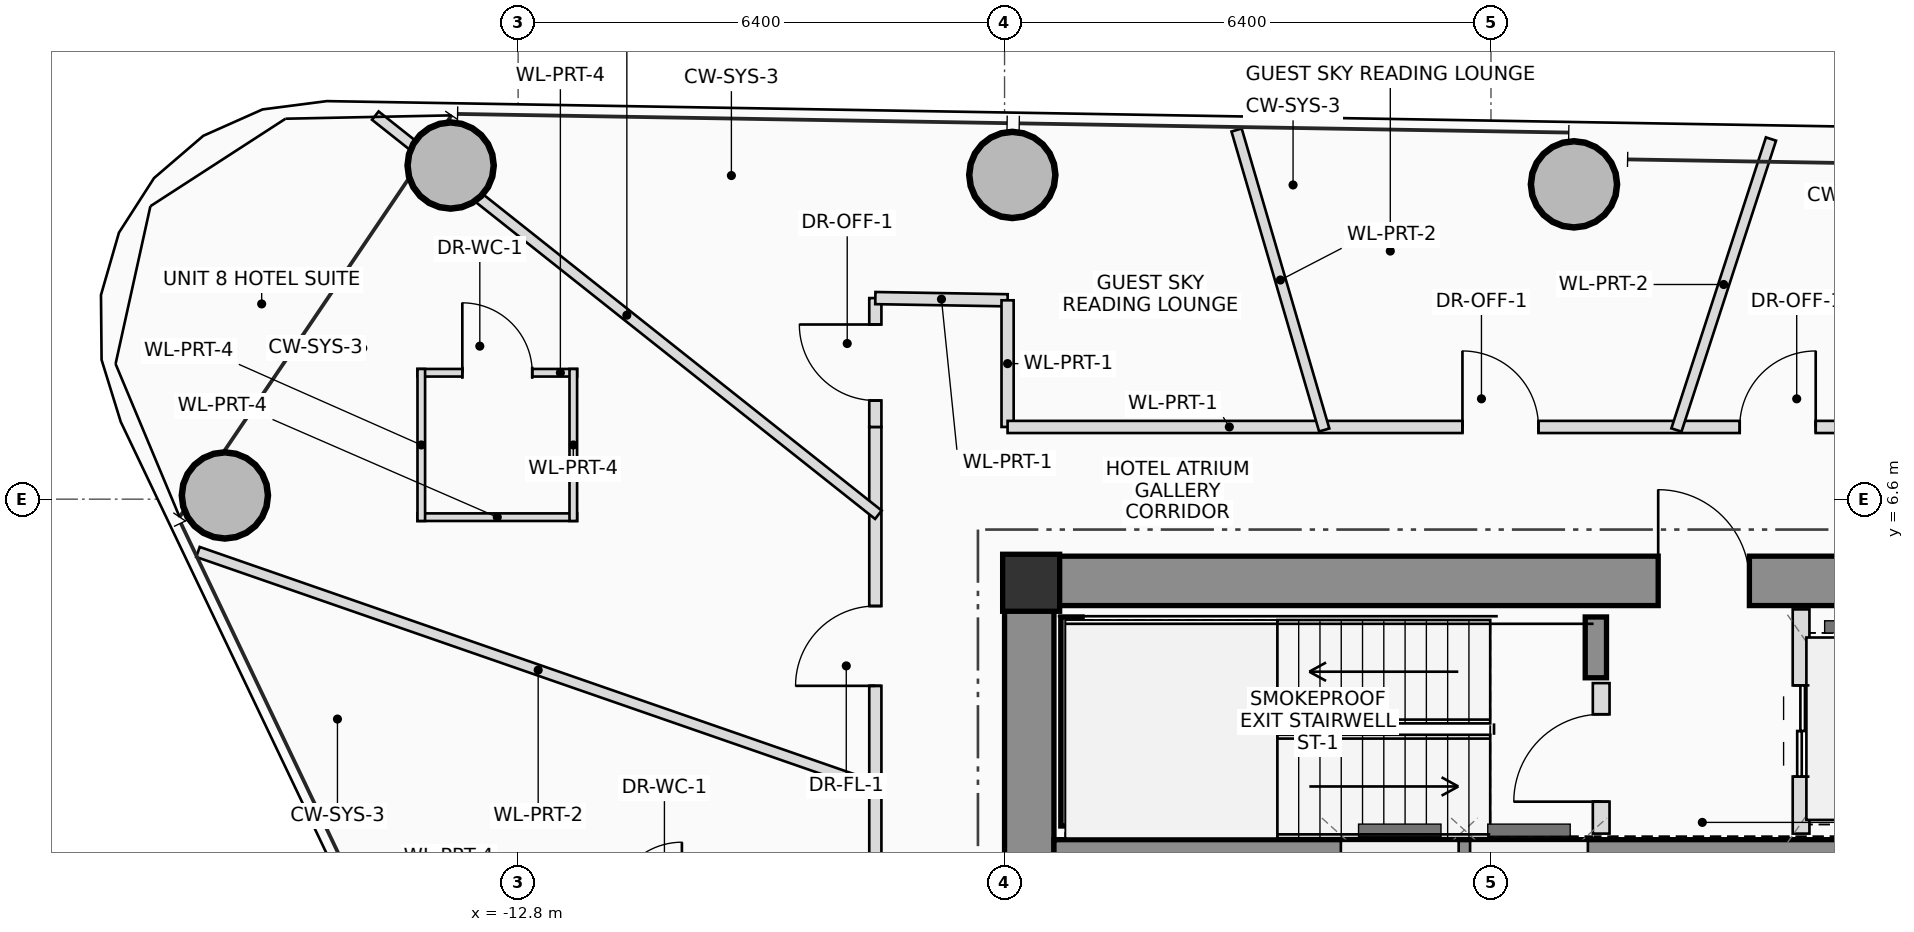
"""IFC4 building model, lengths in metres.
Left out: names, types, materials, properties, quantities, classifications, styles, units other than length and angle.
Written with IfcOpenShell. Run it as: python <this file> out.ifc"""

import sys

from ifc_helpers import new_model, si_unit, direction, frame, frame_2d, origin, origin_2d, place, context, subcontext, project, spatial, rectangle, hollow_circle, extrude, source, transform, mapped, element, fill, save


model = new_model("IFC4")
c1 = context("Model", 3, precision=1e-05, world=origin(), true_north=direction((0.0, 1.0)))
c2 = subcontext(c1, "Body", "Model", "MODEL_VIEW")
j1 = project(units=[si_unit("LENGTHUNIT", "METRE"), si_unit("PLANEANGLEUNIT", "RADIAN")], contexts=[c1])
p1 = place(None, origin())
s1 = spatial("IfcSite", under=j1, at=p1, CompositionType="ELEMENT")
p2 = place(p1, origin())
s2 = spatial("IfcBuilding", under=s1, at=p2, CompositionType="ELEMENT")
p3 = place(p2, frame((0.0, 0.0, 208.7)))
s3 = spatial("IfcBuildingStorey", under=s2, at=p3, CompositionType="ELEMENT", Elevation=208.7)
m1 = source(origin(), c2, "Body", "SweptSolid", [
    extrude(rectangle(XDim=0.75, YDim=0.75, at=origin_2d()), origin(), (0.0, 0.0, 1.0), 3.45),
])
p4 = place(p3, frame((-6.05, 5.5, 0.0), z_axis=(0.0, 0.0, 1.0), x_axis=(1.0, 0.0, 0.0)))
e1 = element("IfcColumn", 1, at=p4, inside=s3, PredefinedType="COLUMN", context=c2, shape_type="MappedRepresentation", body=[
    mapped(m1, transform((0.0, 0.0, 0.0), scale=1.0)),
])
p5 = place(p3, frame((-6.4, 5.525, 0.0), z_axis=(0.0, 0.0, 1.0), x_axis=(1.0, 0.0, 0.0)))
e2 = element("IfcWall", 2, at=p5, inside=s3, PredefinedType="SHEAR", context=c2, shape_type="SweptSolid", body=[
    extrude(rectangle(XDim=12.8, YDim=0.65, at=frame_2d((6.4, 0.0))), origin(), (0.0, 0.0, 1.0), 3.45),
])
p6 = place(p5, frame((8.6, 0.0, 0.0)))
e3 = element("IfcOpeningElement", 3, at=p6, cuts=e2, PredefinedType="OPENING", context=c2, shape_type="SweptSolid", body=[
    extrude(rectangle(XDim=1.2, YDim=2.2, at=frame_2d((0.6, 1.1))), frame((0.0, 0.335, 0.0), z_axis=(0.0, -1.0, 0.0), x_axis=(1.0, 0.0, 0.0)), (0.0, 0.0, 1.0), 0.67),
])
p7 = place(p3, frame((-6.075, 1.75, 0.0), z_axis=(0.0, 0.0, 1.0), x_axis=(0.0, 1.0, 0.0)))
e4 = element("IfcWall", 4, at=p7, inside=s3, PredefinedType="SHEAR", context=c2, shape_type="SweptSolid", body=[
    extrude(rectangle(XDim=3.45, YDim=0.65, at=frame_2d((1.725, 0.0))), origin(), (0.0, 0.0, 1.0), 3.45),
])
p8 = place(p3, frame((-5.75, 1.94, 0.0), z_axis=(0.0, 0.0, 1.0), x_axis=(1.0, 0.0, 0.0)))
e5 = element("IfcWall", 5, at=p8, inside=s3, PredefinedType="SHEAR", context=c2, shape_type="SweptSolid", body=[
    extrude(rectangle(XDim=11.5, YDim=0.36, at=frame_2d((5.75, 0.0))), origin(), (0.0, 0.0, 1.0), 3.45),
])
p9 = place(p3, frame((-5.52, 2.3, 0.0), z_axis=(0.0, 0.0, 1.0), x_axis=(0.0, 1.0, 0.0)))
e6 = element("IfcWall", 6, at=p9, inside=s3, PredefinedType="SHEAR", context=c2, shape_type="SweptSolid", body=[
    extrude(rectangle(XDim=2.75, YDim=0.28, at=frame_2d((1.375, 0.0))), origin(), (0.0, 0.0, 1.0), 3.45),
])
p10 = place(p3, frame((1.38, 4.25, 0.0), z_axis=(0.0, 0.0, 1.0), x_axis=(0.0, 1.0, 0.0)))
e7 = element("IfcWall", 7, at=p10, inside=s3, PredefinedType="SHEAR", context=c2, shape_type="SweptSolid", body=[
    extrude(rectangle(XDim=0.8, YDim=0.28, at=frame_2d((0.4, 0.0))), origin(), (0.0, 0.0, 1.0), 3.45),
])
m2 = source(origin(), c2, "Body", "SweptSolid", [
    extrude(hollow_circle(Radius=0.575, WallThickness=0.042, at=origin_2d()), origin(), (0.0, 0.0, 1.0), 3.45),
])
for number, where, z_axis, x_axis in (
    (8, (1.092, 10.742, 0.0), (0.0, 0.0, 1.0), (1.0, 0.0, 0.0)),
    (9, (-6.298, 10.865, 0.0), (0.0, 0.0, 1.0), (1.0, 0.0, 0.0)),
    (10, (-13.688, 10.99, 0.0), (0.0, 0.0, 1.0), (1.0, 0.0, 0.0)),
    (11, (-16.658, 6.649, 0.0), (0.0, 0.0, 1.0), (1.0, 0.0, 0.0)),
):
    element("IfcColumn", number, at=place(p3, frame(where, z_axis=z_axis, x_axis=x_axis)), inside=s3, PredefinedType="COLUMN", context=c2, shape_type="MappedRepresentation", body=[
        mapped(m2, transform((0.0, 0.0, 0.0), scale=1.0)),
    ])
p11 = place(p3, frame((1.45, 2.2, 0.0), z_axis=(0.0, 0.0, 1.0), x_axis=(0.0, 1.0, 0.0)))
e12 = element("IfcWall", 12, at=p11, inside=s3, PredefinedType="PLUMBINGWALL", context=c2, shape_type="SweptSolid", body=[
    extrude(rectangle(XDim=1.98, YDim=0.22, at=frame_2d((0.99, 0.0))), origin(), (0.0, 0.0, 1.0), 3.25),
])
p12 = place(p11, frame((0.42, 0.0, 0.0)))
e13 = element("IfcOpeningElement", 13, at=p12, cuts=e12, PredefinedType="OPENING", context=c2, shape_type="SweptSolid", body=[
    extrude(rectangle(XDim=1.15, YDim=2.15, at=frame_2d((0.575, 1.075))), frame((0.0, 0.12, 0.0), z_axis=(0.0, -1.0, 0.0), x_axis=(1.0, 0.0, 0.0)), (0.0, 0.0, 1.0), 0.24),
])
p13 = place(p3, frame((4.08, 2.2, 0.0), z_axis=(0.0, 0.0, 1.0), x_axis=(0.0, 1.0, 0.0)))
e14 = element("IfcWall", 14, at=p13, inside=s3, PredefinedType="PLUMBINGWALL", context=c2, shape_type="SweptSolid", body=[
    extrude(rectangle(XDim=2.95, YDim=0.22, at=frame_2d((1.475, 0.0))), origin(), (0.0, 0.0, 1.0), 3.25),
])
p14 = place(p13, frame((0.75, 0.0, 0.0)))
e15 = element("IfcOpeningElement", 15, at=p14, cuts=e14, PredefinedType="OPENING", context=c2, shape_type="SweptSolid", body=[
    extrude(rectangle(XDim=1.2, YDim=2.25, at=frame_2d((0.6, 1.125))), frame((0.0, 0.12, 0.0), z_axis=(0.0, -1.0, 0.0), x_axis=(1.0, 0.0, 0.0)), (0.0, 0.0, 1.0), 0.24),
])
p15 = place(p3, frame((-14.124, 8.263, 0.0), z_axis=(0.0, 0.0, 1.0), x_axis=(1.0, 0.0, 0.0)))
e16 = element("IfcWall", 16, at=p15, inside=s3, PredefinedType="PARTITIONING", context=c2, shape_type="SweptSolid", body=[
    extrude(rectangle(XDim=2.1, YDim=0.1, at=frame_2d((1.05, 0.0))), origin(), (0.0, 0.0, 1.0), 3.25),
])
p16 = place(p15, frame((0.59, 0.0, 0.0)))
e17 = element("IfcOpeningElement", 17, at=p16, cuts=e16, PredefinedType="OPENING", context=c2, shape_type="SweptSolid", body=[
    extrude(rectangle(XDim=0.92, YDim=2.1, at=frame_2d((0.46, 1.05))), frame((0.0, 0.06, 0.0), z_axis=(0.0, -1.0, 0.0), x_axis=(1.0, 0.0, 0.0)), (0.0, 0.0, 1.0), 0.12),
])
p17 = place(p3, frame((-12.024, 6.363, 0.0), z_axis=(0.0, 0.0, 1.0), x_axis=(-1.0, 0.0, 0.0)))
e18 = element("IfcWall", 18, at=p17, inside=s3, PredefinedType="PARTITIONING", context=c2, shape_type="SweptSolid", body=[
    extrude(rectangle(XDim=2.1, YDim=0.1, at=frame_2d((1.05, 0.0))), origin(), (0.0, 0.0, 1.0), 2.605),
])
p18 = place(p3, frame((-12.074, 8.313, 0.0), z_axis=(0.0, 0.0, 1.0), x_axis=(0.0, -1.0, 0.0)))
e19 = element("IfcWall", 19, at=p18, inside=s3, PredefinedType="PARTITIONING", context=c2, shape_type="SweptSolid", body=[
    extrude(rectangle(XDim=2.0, YDim=0.1, at=frame_2d((1.0, 0.0))), origin(), (0.0, 0.0, 1.0), 2.905),
])
p19 = place(p3, frame((-14.074, 6.313, 0.0), z_axis=(0.0, 0.0, 1.0), x_axis=(0.0, 1.0, 0.0)))
e20 = element("IfcWall", 20, at=p19, inside=s3, PredefinedType="PARTITIONING", context=c2, shape_type="SweptSolid", body=[
    extrude(rectangle(XDim=2.0, YDim=0.1, at=frame_2d((1.0, 0.0))), origin(), (0.0, 0.0, 1.0), 2.605),
])
p20 = place(p3, frame((-8.1, -7.46, 0.0), z_axis=(0.0, 0.0, 1.0), x_axis=(0.0, 1.0, 0.0)))
e21 = element("IfcWall", 21, at=p20, inside=s3, PredefinedType="PARTITIONING", context=c2, shape_type="SweptSolid", body=[
    extrude(rectangle(XDim=15.01, YDim=0.16, at=frame_2d((7.505, 0.0))), origin(), (0.0, 0.0, 1.0), 2.605),
])
p21 = place(p20, frame((1.537, 0.0, 0.0)))
e22 = element("IfcOpeningElement", 22, at=p21, cuts=e21, PredefinedType="OPENING", context=c2, shape_type="SweptSolid", body=[
    extrude(rectangle(XDim=0.9, YDim=2.05, at=frame_2d((0.45, 1.025))), frame((0.0, 0.09, 0.0), z_axis=(0.0, -1.0, 0.0), x_axis=(1.0, 0.0, 0.0)), (0.0, 0.0, 1.0), 0.18),
])
p22 = place(p20, frame((6.522, 0.0, 0.0)))
e23 = element("IfcOpeningElement", 23, at=p22, cuts=e21, PredefinedType="OPENING", context=c2, shape_type="SweptSolid", body=[
    extrude(rectangle(XDim=1.05, YDim=2.2, at=frame_2d((0.525, 1.1))), frame((0.0, 0.09, 0.0), z_axis=(0.0, -1.0, 0.0), x_axis=(1.0, 0.0, 0.0)), (0.0, 0.0, 1.0), 0.18),
])
p23 = place(p20, frame((11.604, 0.0, 0.0)))
e24 = element("IfcOpeningElement", 24, at=p23, cuts=e21, PredefinedType="OPENING", context=c2, shape_type="SweptSolid", body=[
    extrude(rectangle(XDim=1.05, YDim=2.2, at=frame_2d((0.525, 1.1))), frame((0.0, 0.09, 0.0), z_axis=(0.0, -1.0, 0.0), x_axis=(1.0, 0.0, 0.0)), (0.0, 0.0, 1.0), 0.18),
])
p24 = place(p3, frame((-8.1, 7.55, 0.0), z_axis=(0.0, 0.0, 1.0), x_axis=(0.0, 1.0, 0.0)))
e25 = element("IfcWall", 25, at=p24, inside=s3, PredefinedType="PARTITIONING", context=c2, shape_type="SweptSolid", body=[
    extrude(rectangle(XDim=1.696, YDim=0.16, at=frame_2d((0.848, 0.0))), origin(), (0.0, 0.0, 1.0), 2.805),
])
p25 = place(p24, frame((0.348, 0.0, 0.0)))
e26 = element("IfcOpeningElement", 26, at=p25, cuts=e25, PredefinedType="OPENING", context=c2, shape_type="SweptSolid", body=[
    extrude(rectangle(XDim=1.0, YDim=2.25, at=frame_2d((0.5, 1.125))), frame((0.0, 0.09, 0.0), z_axis=(0.0, -1.0, 0.0), x_axis=(1.0, 0.0, 0.0)), (0.0, 0.0, 1.0), 0.18),
])
p26 = place(p3, frame((-8.1, 9.246, 0.0), z_axis=(0.0, 0.0, 1.0), x_axis=(0.999858281466, -0.016834992813, 0.0)))
e27 = element("IfcWall", 27, at=p26, inside=s3, PredefinedType="PARTITIONING", context=c2, shape_type="SweptSolid", body=[
    extrude(rectangle(XDim=1.74, YDim=0.16, at=frame_2d((0.87, 0.0))), origin(), (0.0, 0.0, 1.0), 2.905),
])
p27 = place(p3, frame((-6.36, 9.216, 0.0), z_axis=(0.0, 0.0, 1.0), x_axis=(0.0, -1.0, 0.0)))
e28 = element("IfcWall", 28, at=p27, inside=s3, PredefinedType="PARTITIONING", context=c2, shape_type="SweptSolid", body=[
    extrude(rectangle(XDim=1.666, YDim=0.16, at=frame_2d((0.833, 0.0))), origin(), (0.0, 0.0, 1.0), 2.605),
])
p28 = place(p3, frame((-6.36, 7.55, 0.0), z_axis=(0.0, 0.0, 1.0), x_axis=(1.0, 0.0, 0.0)))
e29 = element("IfcWall", 29, at=p28, inside=s3, PredefinedType="PARTITIONING", context=c2, shape_type="SweptSolid", body=[
    extrude(rectangle(XDim=11.61, YDim=0.16, at=frame_2d((5.805, 0.0))), origin(), (0.0, 0.0, 1.0), 2.605),
])
p29 = place(p28, frame((5.985, 0.0, 0.0)))
e30 = element("IfcOpeningElement", 30, at=p29, cuts=e29, PredefinedType="OPENING", context=c2, shape_type="SweptSolid", body=[
    extrude(rectangle(XDim=1.0, YDim=2.25, at=frame_2d((0.5, 1.125))), frame((0.0, 0.09, 0.0), z_axis=(0.0, -1.0, 0.0), x_axis=(1.0, 0.0, 0.0)), (0.0, 0.0, 1.0), 0.18),
])
p30 = place(p28, frame((9.633, 0.0, 0.0)))
e31 = element("IfcOpeningElement", 31, at=p30, cuts=e29, PredefinedType="OPENING", context=c2, shape_type="SweptSolid", body=[
    extrude(rectangle(XDim=1.0, YDim=2.25, at=frame_2d((0.5, 1.125))), frame((0.0, 0.09, 0.0), z_axis=(0.0, -1.0, 0.0), x_axis=(1.0, 0.0, 0.0)), (0.0, 0.0, 1.0), 0.18),
])
p31 = place(p3, frame((2.44, 7.51, 0.0), z_axis=(0.0, 0.0, 1.0), x_axis=(0.309013387048, 0.951057688379, 0.0)))
e32 = element("IfcWall", 32, at=p31, inside=s3, PredefinedType="PARTITIONING", context=c2, shape_type="SweptSolid", body=[
    extrude(rectangle(XDim=4.025, YDim=0.14, at=frame_2d((2.013, 0.0))), origin(), (0.0, 0.0, 1.0), 2.605),
])
p32 = place(p3, frame((-2.194, 7.51, 0.0), z_axis=(0.0, 0.0, 1.0), x_axis=(-0.280410435425, 0.959880194454, 0.0)))
e33 = element("IfcWall", 33, at=p32, inside=s3, PredefinedType="PARTITIONING", context=c2, shape_type="SweptSolid", body=[
    extrude(rectangle(XDim=4.111, YDim=0.14, at=frame_2d((2.056, 0.0))), origin(), (0.0, 0.0, 1.0), 2.765),
])
p33 = place(p3, frame((-8.06, 6.395, 0.0), z_axis=(0.0, 0.0, 1.0), x_axis=(-0.783385602556, 0.621535998723, 0.0)))
e34 = element("IfcWall", 34, at=p33, inside=s3, PredefinedType="PARTITIONING", context=c2, shape_type="SweptSolid", body=[
    extrude(rectangle(XDim=8.449, YDim=0.14, at=frame_2d((4.224, 0.0))), origin(), (0.0, 0.0, 1.0), 2.605),
])
p34 = place(p3, frame((-8.06, 2.798, 0.0), z_axis=(0.0, 0.0, 1.0), x_axis=(-0.944705149401, 0.327920997643, 0.0)))
e35 = element("IfcWall", 35, at=p34, inside=s3, PredefinedType="PARTITIONING", context=c2, shape_type="SweptSolid", body=[
    extrude(rectangle(XDim=9.476, YDim=0.14, at=frame_2d((4.738, 0.0))), origin(), (0.0, 0.0, 1.0), 2.605),
])
p35 = place(p6, origin())
e36 = element("IfcDoor", 36, at=p35, inside=s3, OperationType="SINGLE_SWING_LEFT", PredefinedType="DOOR", context=c2, shape_type="SweptSolid", body=[
    extrude(rectangle(XDim=1.2, YDim=2.2, at=frame_2d((0.6, 1.1))), frame((0.0, 0.025, 0.0), z_axis=(0.0, -1.0, 0.0), x_axis=(1.0, 0.0, 0.0)), (0.0, 0.0, 1.0), 0.05),
])
fill(e3, e36)
p36 = place(p12, origin())
e37 = element("IfcDoor", 37, at=p36, inside=s3, OperationType="SINGLE_SWING_LEFT", PredefinedType="DOOR", context=c2, shape_type="SweptSolid", body=[
    extrude(rectangle(XDim=1.15, YDim=2.15, at=frame_2d((0.575, 1.075))), frame((0.0, 0.025, 0.0), z_axis=(0.0, -1.0, 0.0), x_axis=(1.0, 0.0, 0.0)), (0.0, 0.0, 1.0), 0.05),
])
fill(e13, e37)
p37 = place(p14, origin())
e38 = element("IfcDoor", 38, at=p37, inside=s3, OperationType="DOUBLE_DOOR_SLIDING", PredefinedType="DOOR", context=c2, shape_type="SweptSolid", body=[
    extrude(rectangle(XDim=1.2, YDim=2.25, at=frame_2d((0.6, 1.125))), frame((0.0, 0.025, 0.0), z_axis=(0.0, -1.0, 0.0), x_axis=(1.0, 0.0, 0.0)), (0.0, 0.0, 1.0), 0.05),
])
fill(e15, e38)
p38 = place(p16, origin())
e39 = element("IfcDoor", 39, at=p38, inside=s3, OperationType="SINGLE_SWING_LEFT", PredefinedType="DOOR", context=c2, shape_type="SweptSolid", body=[
    extrude(rectangle(XDim=0.92, YDim=2.1, at=frame_2d((0.46, 1.05))), frame((0.0, 0.025, 0.0), z_axis=(0.0, -1.0, 0.0), x_axis=(1.0, 0.0, 0.0)), (0.0, 0.0, 1.0), 0.05),
])
fill(e17, e39)
p39 = place(p23, origin())
e40 = element("IfcDoor", 40, at=p39, inside=s3, OperationType="SINGLE_SWING_LEFT", PredefinedType="DOOR", context=c2, shape_type="SweptSolid", body=[
    extrude(rectangle(XDim=1.05, YDim=2.2, at=frame_2d((0.525, 1.1))), frame((0.0, 0.025, 0.0), z_axis=(0.0, -1.0, 0.0), x_axis=(1.0, 0.0, 0.0)), (0.0, 0.0, 1.0), 0.05),
])
fill(e24, e40)
p40 = place(p25, origin())
e41 = element("IfcDoor", 41, at=p40, inside=s3, OperationType="SINGLE_SWING_RIGHT", PredefinedType="DOOR", context=c2, shape_type="SweptSolid", body=[
    extrude(rectangle(XDim=1.0, YDim=2.25, at=frame_2d((0.5, 1.125))), frame((0.0, 0.025, 0.0), z_axis=(0.0, -1.0, 0.0), x_axis=(1.0, 0.0, 0.0)), (0.0, 0.0, 1.0), 0.05),
])
fill(e26, e41)
p41 = place(p29, origin())
e42 = element("IfcDoor", 42, at=p41, inside=s3, OperationType="SINGLE_SWING_LEFT", PredefinedType="DOOR", context=c2, shape_type="SweptSolid", body=[
    extrude(rectangle(XDim=1.0, YDim=2.25, at=frame_2d((0.5, 1.125))), frame((0.0, 0.025, 0.0), z_axis=(0.0, -1.0, 0.0), x_axis=(1.0, 0.0, 0.0)), (0.0, 0.0, 1.0), 0.05),
])
fill(e30, e42)
p42 = place(p30, origin())
e43 = element("IfcDoor", 43, at=p42, inside=s3, OperationType="SINGLE_SWING_RIGHT", PredefinedType="DOOR", context=c2, shape_type="SweptSolid", body=[
    extrude(rectangle(XDim=1.0, YDim=2.25, at=frame_2d((0.5, 1.125))), frame((0.0, 0.025, 0.0), z_axis=(0.0, -1.0, 0.0), x_axis=(1.0, 0.0, 0.0)), (0.0, 0.0, 1.0), 0.05),
])
fill(e31, e43)
save(model, sys.argv[1])
